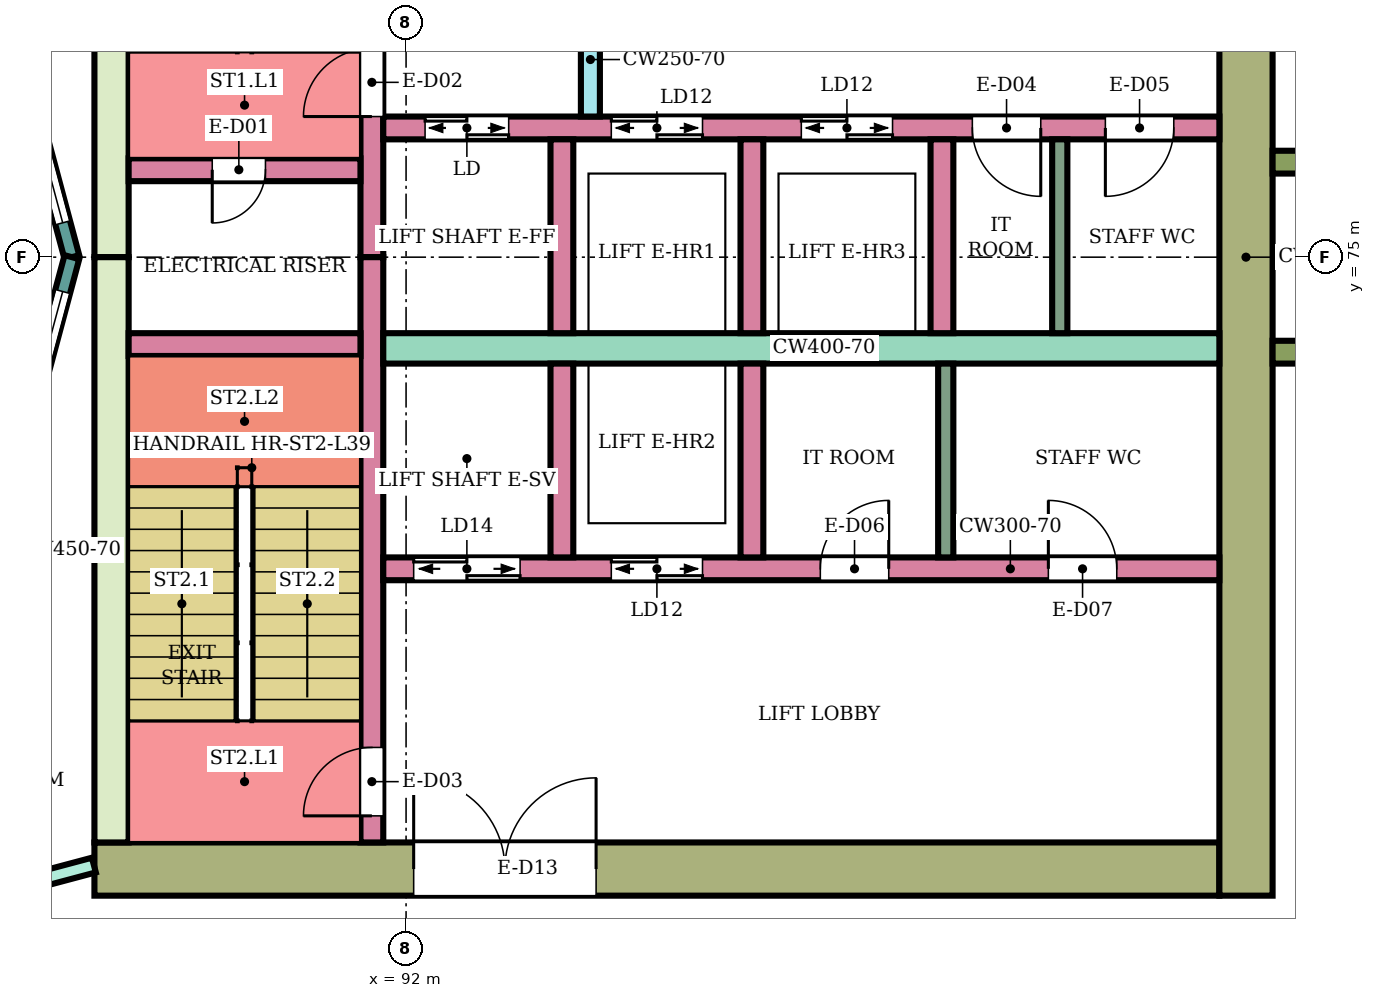
"""IFC4 building model, lengths in metres.
Left out: names, types, materials, properties, quantities, classifications, styles, units other than length and angle.
Written with IfcOpenShell. Run it as: python <this file> out.ifc"""

import sys

from ifc_helpers import new_model, si_unit, direction, frame, frame_2d, origin, place, context, subcontext, project, spatial, rectangle, extrude, element, fill, save


model = new_model("IFC4")
c1 = context("Model", 3, precision=1e-05, world=origin(), true_north=direction((0.0, 1.0)))
c2 = subcontext(c1, "Body", "Model", "MODEL_VIEW")
j1 = project(units=[si_unit("LENGTHUNIT", "METRE"), si_unit("PLANEANGLEUNIT", "RADIAN")], contexts=[c1])
p1 = place(None, origin())
s1 = spatial("IfcSite", under=j1, at=p1, CompositionType="ELEMENT")
p2 = place(p1, origin())
s2 = spatial("IfcBuilding", under=s1, at=p2, CompositionType="ELEMENT")
p3 = place(p2, frame((0.0, 0.0, 170.0)))
s3 = spatial("IfcBuildingStorey", under=s2, at=p3, CompositionType="ELEMENT", Elevation=170.0)
p4 = place(p3, frame((87.9, 66.95, 0.0), z_axis=(0.0, 0.0, 1.0), x_axis=(1.0, 0.0, 0.0)))
e1 = element("IfcWall", 1, at=p4, inside=s3, PredefinedType="SHEAR", context=c2, shape_type="SweptSolid", body=[
    extrude(rectangle(XDim=14.8, YDim=0.7, at=frame_2d((7.4, 0.0))), origin(), (0.0, 0.0, 1.0), 3.78),
])
p5 = place(p4, frame((4.2, 0.0, 0.0)))
e2 = element("IfcOpeningElement", 2, at=p5, cuts=e1, PredefinedType="OPENING", context=c2, shape_type="SweptSolid", body=[
    extrude(rectangle(XDim=2.4, YDim=2.4, at=frame_2d((1.2, 1.2))), frame((0.0, 0.36, 0.0), z_axis=(0.0, -1.0, 0.0), x_axis=(1.0, 0.0, 0.0)), (0.0, 0.0, 1.0), 0.72),
])
for number, where, z_axis, x_axis in (
    (3, (88.125, 75.0, 0.0), (0.0, 0.0, 1.0), (0.0, 1.0, 0.0)),
    (4, (88.125, 67.3, 0.0), (0.0, 0.0, 1.0), (0.0, 1.0, 0.0)),
):
    element("IfcWall", number, at=place(p3, frame(where, z_axis=z_axis, x_axis=x_axis)), inside=s3, PredefinedType="SHEAR", context=c2, shape_type="SweptSolid", body=[
        extrude(rectangle(XDim=7.7, YDim=0.45, at=frame_2d((3.85, 0.0))), origin(), (0.0, 0.0, 1.0), 3.78),
    ])
p6 = place(p3, frame((103.05, 66.6, 0.0), z_axis=(0.0, 0.0, 1.0), x_axis=(0.0, 1.0, 0.0)))
e5 = element("IfcWall", 5, at=p6, inside=s3, PredefinedType="SHEAR", context=c2, shape_type="SweptSolid", body=[
    extrude(rectangle(XDim=16.8, YDim=0.7, at=frame_2d((8.4, 0.0))), origin(), (0.0, 0.0, 1.0), 3.78),
])
p7 = place(p3, frame((91.55, 75.0, 0.0), z_axis=(0.0, 0.0, 1.0), x_axis=(0.0, 1.0, 0.0)))
e6 = element("IfcWall", 6, at=p7, inside=s3, PredefinedType="SHEAR", context=c2, shape_type="SweptSolid", body=[
    extrude(rectangle(XDim=7.7, YDim=0.3, at=frame_2d((3.85, 0.0))), origin(), (0.0, 0.0, 1.0), 3.78),
])
p8 = place(p7, frame((1.85, 0.0, 0.0)))
e7 = element("IfcOpeningElement", 7, at=p8, cuts=e6, PredefinedType="OPENING", context=c2, shape_type="SweptSolid", body=[
    extrude(rectangle(XDim=0.9, YDim=2.1, at=frame_2d((0.45, 1.05))), frame((0.0, 0.16, 0.0), z_axis=(0.0, -1.0, 0.0), x_axis=(1.0, 0.0, 0.0)), (0.0, 0.0, 1.0), 0.32),
])
p9 = place(p3, frame((91.55, 67.3, 0.0), z_axis=(0.0, 0.0, 1.0), x_axis=(0.0, 1.0, 0.0)))
e8 = element("IfcWall", 8, at=p9, inside=s3, PredefinedType="SHEAR", context=c2, shape_type="SweptSolid", body=[
    extrude(rectangle(XDim=7.7, YDim=0.3, at=frame_2d((3.85, 0.0))), origin(), (0.0, 0.0, 1.0), 3.78),
])
p10 = place(p9, frame((0.35, 0.0, 0.0)))
e9 = element("IfcOpeningElement", 9, at=p10, cuts=e8, PredefinedType="OPENING", context=c2, shape_type="SweptSolid", body=[
    extrude(rectangle(XDim=0.9, YDim=2.1, at=frame_2d((0.45, 1.05))), frame((0.0, 0.16, 0.0), z_axis=(0.0, -1.0, 0.0), x_axis=(1.0, 0.0, 0.0)), (0.0, 0.0, 1.0), 0.32),
])
p11 = place(p3, frame((88.35, 76.15, 0.0), z_axis=(0.0, 0.0, 1.0), x_axis=(1.0, 0.0, 0.0)))
e10 = element("IfcWall", 10, at=p11, inside=s3, PredefinedType="SHEAR", context=c2, shape_type="SweptSolid", body=[
    extrude(rectangle(XDim=3.05, YDim=0.3, at=frame_2d((1.525, 0.0))), origin(), (0.0, 0.0, 1.0), 3.78),
])
p12 = place(p11, frame((1.1, 0.0, 0.0)))
e11 = element("IfcOpeningElement", 11, at=p12, cuts=e10, PredefinedType="OPENING", context=c2, shape_type="SweptSolid", body=[
    extrude(rectangle(XDim=0.7, YDim=2.0, at=frame_2d((0.35, 1.0))), frame((0.0, 0.16, 0.0), z_axis=(0.0, -1.0, 0.0), x_axis=(1.0, 0.0, 0.0)), (0.0, 0.0, 1.0), 0.32),
])
p13 = place(p3, frame((88.35, 73.85, 0.0), z_axis=(0.0, 0.0, 1.0), x_axis=(1.0, 0.0, 0.0)))
e12 = element("IfcWall", 12, at=p13, inside=s3, PredefinedType="SHEAR", context=c2, shape_type="SweptSolid", body=[
    extrude(rectangle(XDim=3.05, YDim=0.3, at=frame_2d((1.525, 0.0))), origin(), (0.0, 0.0, 1.0), 3.78),
])
p14 = place(p3, frame((91.7, 76.7, 0.0), z_axis=(0.0, 0.0, 1.0), x_axis=(1.0, 0.0, 0.0)))
e13 = element("IfcWall", 13, at=p14, inside=s3, PredefinedType="SHEAR", context=c2, shape_type="SweptSolid", body=[
    extrude(rectangle(XDim=11.0, YDim=0.3, at=frame_2d((5.5, 0.0))), origin(), (0.0, 0.0, 1.0), 3.78),
])
p15 = place(p14, frame((0.55, 0.0, 0.0)))
e14 = element("IfcOpeningElement", 14, at=p15, cuts=e13, PredefinedType="OPENING", context=c2, shape_type="SweptSolid", body=[
    extrude(rectangle(XDim=1.1, YDim=2.1, at=frame_2d((0.55, 1.05))), frame((0.0, 0.16, 0.0), z_axis=(0.0, -1.0, 0.0), x_axis=(1.0, 0.0, 0.0)), (0.0, 0.0, 1.0), 0.32),
])
p16 = place(p14, frame((3.0, 0.0, 0.0)))
e15 = element("IfcOpeningElement", 15, at=p16, cuts=e13, PredefinedType="OPENING", context=c2, shape_type="SweptSolid", body=[
    extrude(rectangle(XDim=1.2, YDim=2.1, at=frame_2d((0.6, 1.05))), frame((0.0, 0.16, 0.0), z_axis=(0.0, -1.0, 0.0), x_axis=(1.0, 0.0, 0.0)), (0.0, 0.0, 1.0), 0.32),
])
p17 = place(p14, frame((5.5, 0.0, 0.0)))
e16 = element("IfcOpeningElement", 16, at=p17, cuts=e13, PredefinedType="OPENING", context=c2, shape_type="SweptSolid", body=[
    extrude(rectangle(XDim=1.2, YDim=2.1, at=frame_2d((0.6, 1.05))), frame((0.0, 0.16, 0.0), z_axis=(0.0, -1.0, 0.0), x_axis=(1.0, 0.0, 0.0)), (0.0, 0.0, 1.0), 0.32),
])
p18 = place(p14, frame((7.75, 0.0, 0.0)))
e17 = element("IfcOpeningElement", 17, at=p18, cuts=e13, PredefinedType="OPENING", context=c2, shape_type="SweptSolid", body=[
    extrude(rectangle(XDim=0.9, YDim=2.1, at=frame_2d((0.45, 1.05))), frame((0.0, 0.16, 0.0), z_axis=(0.0, -1.0, 0.0), x_axis=(1.0, 0.0, 0.0)), (0.0, 0.0, 1.0), 0.32),
])
p19 = place(p14, frame((9.5, 0.0, 0.0)))
e18 = element("IfcOpeningElement", 18, at=p19, cuts=e13, PredefinedType="OPENING", context=c2, shape_type="SweptSolid", body=[
    extrude(rectangle(XDim=0.9, YDim=2.1, at=frame_2d((0.45, 1.05))), frame((0.0, 0.16, 0.0), z_axis=(0.0, -1.0, 0.0), x_axis=(1.0, 0.0, 0.0)), (0.0, 0.0, 1.0), 0.32),
])
p20 = place(p3, frame((91.7, 73.8, 0.0), z_axis=(0.0, 0.0, 1.0), x_axis=(1.0, 0.0, 0.0)))
e19 = element("IfcWall", 19, at=p20, inside=s3, PredefinedType="SHEAR", context=c2, shape_type="SweptSolid", body=[
    extrude(rectangle(XDim=11.0, YDim=0.4, at=frame_2d((5.5, 0.0))), origin(), (0.0, 0.0, 1.0), 3.78),
])
p21 = place(p3, frame((91.7, 70.9, 0.0), z_axis=(0.0, 0.0, 1.0), x_axis=(1.0, 0.0, 0.0)))
e20 = element("IfcWall", 20, at=p21, inside=s3, PredefinedType="SHEAR", context=c2, shape_type="SweptSolid", body=[
    extrude(rectangle(XDim=11.0, YDim=0.3, at=frame_2d((5.5, 0.0))), origin(), (0.0, 0.0, 1.0), 3.78),
])
p22 = place(p21, frame((0.4, 0.0, 0.0)))
e21 = element("IfcOpeningElement", 21, at=p22, cuts=e20, PredefinedType="OPENING", context=c2, shape_type="SweptSolid", body=[
    extrude(rectangle(XDim=1.4, YDim=2.1, at=frame_2d((0.7, 1.05))), frame((0.0, 0.16, 0.0), z_axis=(0.0, -1.0, 0.0), x_axis=(1.0, 0.0, 0.0)), (0.0, 0.0, 1.0), 0.32),
])
p23 = place(p21, frame((3.0, 0.0, 0.0)))
e22 = element("IfcOpeningElement", 22, at=p23, cuts=e20, PredefinedType="OPENING", context=c2, shape_type="SweptSolid", body=[
    extrude(rectangle(XDim=1.2, YDim=2.1, at=frame_2d((0.6, 1.05))), frame((0.0, 0.16, 0.0), z_axis=(0.0, -1.0, 0.0), x_axis=(1.0, 0.0, 0.0)), (0.0, 0.0, 1.0), 0.32),
])
p24 = place(p21, frame((5.75, 0.0, 0.0)))
e23 = element("IfcOpeningElement", 23, at=p24, cuts=e20, PredefinedType="OPENING", context=c2, shape_type="SweptSolid", body=[
    extrude(rectangle(XDim=0.9, YDim=2.1, at=frame_2d((0.45, 1.05))), frame((0.0, 0.16, 0.0), z_axis=(0.0, -1.0, 0.0), x_axis=(1.0, 0.0, 0.0)), (0.0, 0.0, 1.0), 0.32),
])
p25 = place(p21, frame((8.75, 0.0, 0.0)))
e24 = element("IfcOpeningElement", 24, at=p25, cuts=e20, PredefinedType="OPENING", context=c2, shape_type="SweptSolid", body=[
    extrude(rectangle(XDim=0.9, YDim=2.1, at=frame_2d((0.45, 1.05))), frame((0.0, 0.16, 0.0), z_axis=(0.0, -1.0, 0.0), x_axis=(1.0, 0.0, 0.0)), (0.0, 0.0, 1.0), 0.32),
])
for number, where, z_axis, x_axis in (
    (25, (94.05, 74.0, 0.0), (0.0, 0.0, 1.0), (0.0, 1.0, 0.0)),
    (26, (96.55, 74.0, 0.0), (0.0, 0.0, 1.0), (0.0, 1.0, 0.0)),
    (27, (99.05, 74.0, 0.0), (0.0, 0.0, 1.0), (0.0, 1.0, 0.0)),
    (28, (94.05, 71.05, 0.0), (0.0, 0.0, 1.0), (0.0, 1.0, 0.0)),
    (29, (96.55, 71.05, 0.0), (0.0, 0.0, 1.0), (0.0, 1.0, 0.0)),
):
    element("IfcWall", number, at=place(p3, frame(where, z_axis=z_axis, x_axis=x_axis)), inside=s3, PredefinedType="SHEAR", context=c2, shape_type="SweptSolid", body=[
        extrude(rectangle(XDim=2.55, YDim=0.3, at=frame_2d((1.275, 0.0))), origin(), (0.0, 0.0, 1.0), 3.78),
    ])
p26 = place(p3, frame((94.425, 76.85, 0.0), z_axis=(0.0, 0.0, 1.0), x_axis=(0.0, 1.0, 0.0)))
e30 = element("IfcWall", 30, at=p26, inside=s3, PredefinedType="SHEAR", context=c2, shape_type="SweptSolid", body=[
    extrude(rectangle(XDim=1.5, YDim=0.25, at=frame_2d((0.75, 0.0))), origin(), (0.0, 0.0, 1.0), 3.78),
])
for number, where, z_axis, x_axis in (
    (31, (103.4, 73.75, 0.0), (0.0, 0.0, 1.0), (1.0, 0.0, 0.0)),
    (32, (103.4, 76.25, 0.0), (0.0, 0.0, 1.0), (1.0, 0.0, 0.0)),
):
    element("IfcWall", number, at=place(p3, frame(where, z_axis=z_axis, x_axis=x_axis)), inside=s3, PredefinedType="NOTDEFINED", context=c2, shape_type="SweptSolid", body=[
        extrude(rectangle(XDim=2.416, YDim=0.3, at=frame_2d((1.208, 0.0))), origin(), (0.0, 0.0, 1.0), 4.1),
    ])
p27 = place(p3, frame((87.604, 75.0, 0.0), z_axis=(0.0, 0.0, 1.0), x_axis=(-0.258789828301, 0.965933654434, 0.0)))
e33 = element("IfcWall", 33, at=p27, inside=s3, PredefinedType="NOTDEFINED", context=c2, shape_type="SweptSolid", body=[
    extrude(rectangle(XDim=3.936, YDim=0.2, at=frame_2d((1.968, 0.0))), origin(), (0.0, 0.0, 1.0), 4.1),
])
p28 = place(p27, frame((0.468, 0.0, 0.9)))
e34 = element("IfcOpeningElement", 34, at=p28, cuts=e33, PredefinedType="OPENING", context=c2, shape_type="SweptSolid", body=[
    extrude(rectangle(XDim=3.0, YDim=2.3, at=frame_2d((1.5, 1.15))), frame((0.0, 0.11, 0.0), z_axis=(0.0, -1.0, 0.0), x_axis=(1.0, 0.0, 0.0)), (0.0, 0.0, 1.0), 0.22),
])
p29 = place(p3, frame((86.585, 71.198, 0.0), z_axis=(0.0, 0.0, 1.0), x_axis=(0.258789828301, 0.965933654434, 0.0)))
e35 = element("IfcWall", 35, at=p29, inside=s3, PredefinedType="NOTDEFINED", context=c2, shape_type="SweptSolid", body=[
    extrude(rectangle(XDim=3.936, YDim=0.2, at=frame_2d((1.968, 0.0))), origin(), (0.0, 0.0, 1.0), 4.1),
])
p30 = place(p29, frame((0.468, 0.0, 0.9)))
e36 = element("IfcOpeningElement", 36, at=p30, cuts=e35, PredefinedType="OPENING", context=c2, shape_type="SweptSolid", body=[
    extrude(rectangle(XDim=3.0, YDim=2.3, at=frame_2d((1.5, 1.15))), frame((0.0, 0.11, 0.0), z_axis=(0.0, -1.0, 0.0), x_axis=(1.0, 0.0, 0.0)), (0.0, 0.0, 1.0), 0.22),
])
p31 = place(p3, frame((80.0, 64.898, 0.0), z_axis=(0.0, 0.0, 1.0), x_axis=(0.966237419782, 0.257653349704, 0.0)))
e37 = element("IfcWall", 37, at=p31, inside=s3, PredefinedType="PARTITIONING", context=c2, shape_type="SweptSolid", body=[
    extrude(rectangle(XDim=8.169, YDim=0.2, at=frame_2d((4.084, 0.0))), origin(), (0.0, 0.0, 1.0), 3.65),
])
p32 = place(p31, frame((6.428, 0.0, 0.0)))
e38 = element("IfcOpeningElement", 38, at=p32, cuts=e37, PredefinedType="OPENING", context=c2, shape_type="SweptSolid", body=[
    extrude(rectangle(XDim=0.9, YDim=2.1, at=frame_2d((0.45, 1.05))), frame((0.0, 0.11, 0.0), z_axis=(0.0, -1.0, 0.0), x_axis=(1.0, 0.0, 0.0)), (0.0, 0.0, 1.0), 0.22),
])
for number, where, z_axis, x_axis in (
    (39, (100.6, 74.0, 0.0), (0.0, 0.0, 1.0), (0.0, 1.0, 0.0)),
    (40, (99.1, 71.05, 0.0), (0.0, 0.0, 1.0), (0.0, 1.0, 0.0)),
):
    element("IfcWall", number, at=place(p3, frame(where, z_axis=z_axis, x_axis=x_axis)), inside=s3, PredefinedType="PARTITIONING", context=c2, shape_type="SweptSolid", body=[
        extrude(rectangle(XDim=2.55, YDim=0.2, at=frame_2d((1.275, 0.0))), origin(), (0.0, 0.0, 1.0), 3.78),
    ])
p33 = place(p28, origin())
e41 = element("IfcWindow", 41, at=p33, inside=s3, PartitioningType="SINGLE_PANEL", PredefinedType="WINDOW", context=c2, shape_type="SweptSolid", body=[
    extrude(rectangle(XDim=3.0, YDim=2.3, at=frame_2d((1.5, 1.15))), frame((0.0, 0.03, 0.0), z_axis=(0.0, -1.0, 0.0), x_axis=(1.0, 0.0, 0.0)), (0.0, 0.0, 1.0), 0.06),
])
fill(e34, e41)
p34 = place(p30, origin())
e42 = element("IfcWindow", 42, at=p34, inside=s3, PartitioningType="SINGLE_PANEL", PredefinedType="WINDOW", context=c2, shape_type="SweptSolid", body=[
    extrude(rectangle(XDim=3.0, YDim=2.3, at=frame_2d((1.5, 1.15))), frame((0.0, 0.03, 0.0), z_axis=(0.0, -1.0, 0.0), x_axis=(1.0, 0.0, 0.0)), (0.0, 0.0, 1.0), 0.06),
])
fill(e36, e42)
p35 = place(p12, frame((0.7, 0.0, 0.0), z_axis=(0.0, 0.0, 1.0), x_axis=(-1.0, 0.0, 0.0)))
e43 = element("IfcDoor", 43, at=p35, inside=s3, OperationType="SINGLE_SWING_RIGHT", PredefinedType="DOOR", context=c2, shape_type="SweptSolid", body=[
    extrude(rectangle(XDim=0.7, YDim=2.0, at=frame_2d((0.35, 1.0))), frame((0.0, 0.025, 0.0), z_axis=(0.0, -1.0, 0.0), x_axis=(1.0, 0.0, 0.0)), (0.0, 0.0, 1.0), 0.05),
])
fill(e11, e43)
p36 = place(p8, origin())
e44 = element("IfcDoor", 44, at=p36, inside=s3, OperationType="SINGLE_SWING_LEFT", PredefinedType="DOOR", context=c2, shape_type="SweptSolid", body=[
    extrude(rectangle(XDim=0.9, YDim=2.1, at=frame_2d((0.45, 1.05))), frame((0.0, 0.025, 0.0), z_axis=(0.0, -1.0, 0.0), x_axis=(1.0, 0.0, 0.0)), (0.0, 0.0, 1.0), 0.05),
])
fill(e7, e44)
p37 = place(p10, origin())
e45 = element("IfcDoor", 45, at=p37, inside=s3, OperationType="SINGLE_SWING_LEFT", PredefinedType="DOOR", context=c2, shape_type="SweptSolid", body=[
    extrude(rectangle(XDim=0.9, YDim=2.1, at=frame_2d((0.45, 1.05))), frame((0.0, 0.025, 0.0), z_axis=(0.0, -1.0, 0.0), x_axis=(1.0, 0.0, 0.0)), (0.0, 0.0, 1.0), 0.05),
])
fill(e9, e45)
p38 = place(p15, origin())
e46 = element("IfcDoor", 46, at=p38, inside=s3, OperationType="DOUBLE_DOOR_SLIDING", PredefinedType="DOOR", context=c2, shape_type="SweptSolid", body=[
    extrude(rectangle(XDim=1.1, YDim=2.1, at=frame_2d((0.55, 1.05))), frame((0.0, 0.025, 0.0), z_axis=(0.0, -1.0, 0.0), x_axis=(1.0, 0.0, 0.0)), (0.0, 0.0, 1.0), 0.05),
])
fill(e14, e46)
p39 = place(p16, origin())
e47 = element("IfcDoor", 47, at=p39, inside=s3, OperationType="DOUBLE_DOOR_SLIDING", PredefinedType="DOOR", context=c2, shape_type="SweptSolid", body=[
    extrude(rectangle(XDim=1.2, YDim=2.1, at=frame_2d((0.6, 1.05))), frame((0.0, 0.025, 0.0), z_axis=(0.0, -1.0, 0.0), x_axis=(1.0, 0.0, 0.0)), (0.0, 0.0, 1.0), 0.05),
])
fill(e15, e47)
p40 = place(p17, origin())
e48 = element("IfcDoor", 48, at=p40, inside=s3, OperationType="DOUBLE_DOOR_SLIDING", PredefinedType="DOOR", context=c2, shape_type="SweptSolid", body=[
    extrude(rectangle(XDim=1.2, YDim=2.1, at=frame_2d((0.6, 1.05))), frame((0.0, 0.025, 0.0), z_axis=(0.0, -1.0, 0.0), x_axis=(1.0, 0.0, 0.0)), (0.0, 0.0, 1.0), 0.05),
])
fill(e16, e48)
p41 = place(p18, frame((0.9, 0.0, 0.0), z_axis=(0.0, 0.0, 1.0), x_axis=(-1.0, 0.0, 0.0)))
e49 = element("IfcDoor", 49, at=p41, inside=s3, OperationType="SINGLE_SWING_LEFT", PredefinedType="DOOR", context=c2, shape_type="SweptSolid", body=[
    extrude(rectangle(XDim=0.9, YDim=2.1, at=frame_2d((0.45, 1.05))), frame((0.0, 0.025, 0.0), z_axis=(0.0, -1.0, 0.0), x_axis=(1.0, 0.0, 0.0)), (0.0, 0.0, 1.0), 0.05),
])
fill(e17, e49)
p42 = place(p19, frame((0.9, 0.0, 0.0), z_axis=(0.0, 0.0, 1.0), x_axis=(-1.0, 0.0, 0.0)))
e50 = element("IfcDoor", 50, at=p42, inside=s3, OperationType="SINGLE_SWING_RIGHT", PredefinedType="DOOR", context=c2, shape_type="SweptSolid", body=[
    extrude(rectangle(XDim=0.9, YDim=2.1, at=frame_2d((0.45, 1.05))), frame((0.0, 0.025, 0.0), z_axis=(0.0, -1.0, 0.0), x_axis=(1.0, 0.0, 0.0)), (0.0, 0.0, 1.0), 0.05),
])
fill(e18, e50)
p43 = place(p22, origin())
e51 = element("IfcDoor", 51, at=p43, inside=s3, OperationType="DOUBLE_DOOR_SLIDING", PredefinedType="DOOR", context=c2, shape_type="SweptSolid", body=[
    extrude(rectangle(XDim=1.4, YDim=2.1, at=frame_2d((0.7, 1.05))), frame((0.0, 0.025, 0.0), z_axis=(0.0, -1.0, 0.0), x_axis=(1.0, 0.0, 0.0)), (0.0, 0.0, 1.0), 0.05),
])
fill(e21, e51)
p44 = place(p23, origin())
e52 = element("IfcDoor", 52, at=p44, inside=s3, OperationType="DOUBLE_DOOR_SLIDING", PredefinedType="DOOR", context=c2, shape_type="SweptSolid", body=[
    extrude(rectangle(XDim=1.2, YDim=2.1, at=frame_2d((0.6, 1.05))), frame((0.0, 0.025, 0.0), z_axis=(0.0, -1.0, 0.0), x_axis=(1.0, 0.0, 0.0)), (0.0, 0.0, 1.0), 0.05),
])
fill(e22, e52)
p45 = place(p24, origin())
e53 = element("IfcDoor", 53, at=p45, inside=s3, OperationType="SINGLE_SWING_RIGHT", PredefinedType="DOOR", context=c2, shape_type="SweptSolid", body=[
    extrude(rectangle(XDim=0.9, YDim=2.1, at=frame_2d((0.45, 1.05))), frame((0.0, 0.025, 0.0), z_axis=(0.0, -1.0, 0.0), x_axis=(1.0, 0.0, 0.0)), (0.0, 0.0, 1.0), 0.05),
])
fill(e23, e53)
p46 = place(p25, origin())
e54 = element("IfcDoor", 54, at=p46, inside=s3, OperationType="SINGLE_SWING_LEFT", PredefinedType="DOOR", context=c2, shape_type="SweptSolid", body=[
    extrude(rectangle(XDim=0.9, YDim=2.1, at=frame_2d((0.45, 1.05))), frame((0.0, 0.025, 0.0), z_axis=(0.0, -1.0, 0.0), x_axis=(1.0, 0.0, 0.0)), (0.0, 0.0, 1.0), 0.05),
])
fill(e24, e54)
p47 = place(p5, origin())
e55 = element("IfcDoor", 55, at=p47, inside=s3, OperationType="DOUBLE_DOOR_SINGLE_SWING", PredefinedType="DOOR", context=c2, shape_type="SweptSolid", body=[
    extrude(rectangle(XDim=2.4, YDim=2.4, at=frame_2d((1.2, 1.2))), frame((0.0, 0.025, 0.0), z_axis=(0.0, -1.0, 0.0), x_axis=(1.0, 0.0, 0.0)), (0.0, 0.0, 1.0), 0.05),
])
fill(e2, e55)
save(model, sys.argv[1])
